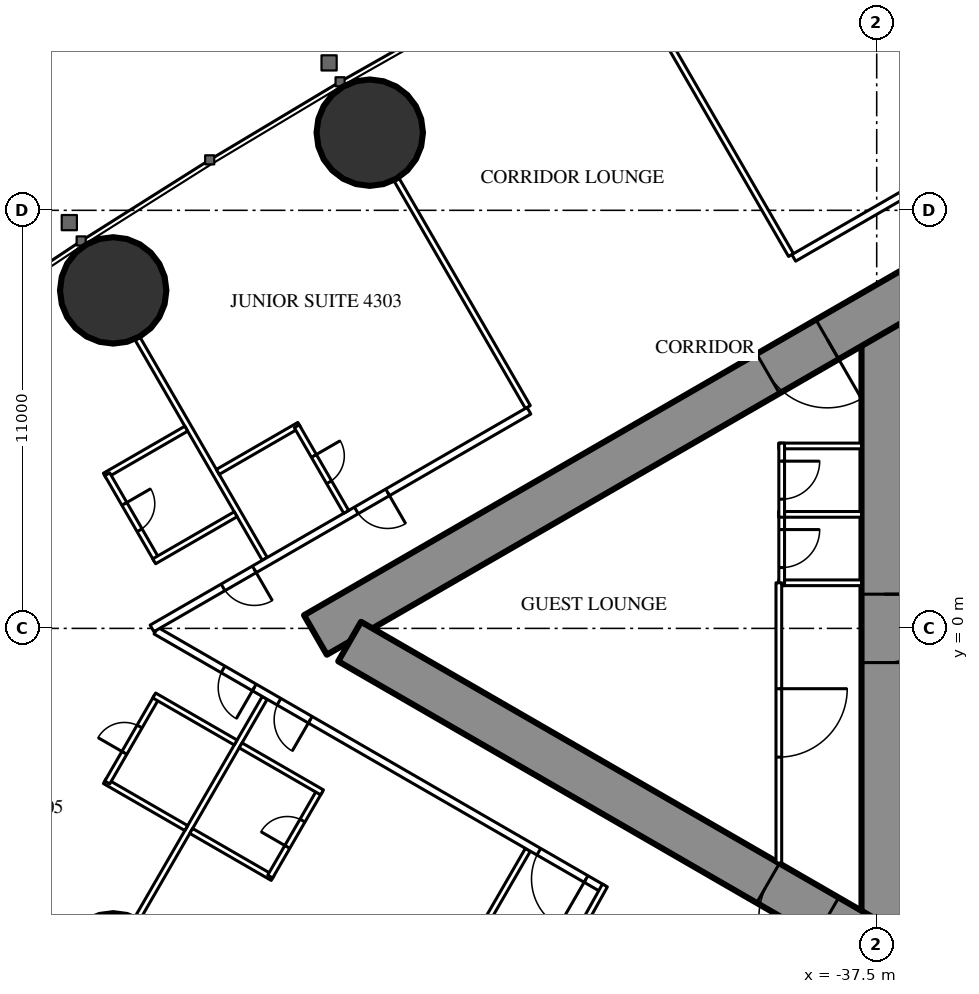
"""IFC4 building model, lengths in metres.
Left out: names, types, materials, properties, quantities, classifications, styles, units other than length and angle.
Written with IfcOpenShell. Run it as: python <this file> out.ifc"""

import sys

from ifc_helpers import new_model, si_unit, direction, frame, frame_2d, origin, origin_2d, place, context, subcontext, project, spatial, rectangle, circle, extrude, element, fill, save


model = new_model("IFC4")
c1 = context("Model", 3, precision=1e-05, world=origin(), true_north=direction((0.0, 1.0)))
c2 = subcontext(c1, "Body", "Model", "MODEL_VIEW")
j1 = project(units=[si_unit("LENGTHUNIT", "METRE"), si_unit("PLANEANGLEUNIT", "RADIAN")], contexts=[c1])
p1 = place(None, origin())
s1 = spatial("IfcSite", under=j1, at=p1, CompositionType="ELEMENT")
p2 = place(p1, origin())
s2 = spatial("IfcBuilding", under=s1, at=p2, CompositionType="ELEMENT")
p3 = place(p2, frame((0.0, 0.0, 163.3)))
s3 = spatial("IfcBuildingStorey", under=s2, at=p3, CompositionType="ELEMENT", Elevation=163.3)
for number, where, z_axis, x_axis in (
    (1, (-57.59, -8.893, 0.0), (0.0, 0.0, 1.0), (1.0, 0.0, 0.0)),
    (2, (-50.839, 13.043, 0.0), (0.0, 0.0, 1.0), (1.0, 0.0, 0.0)),
    (3, (-57.59, 8.893, 0.0), (0.0, 0.0, 1.0), (1.0, 0.0, 0.0)),
):
    element("IfcColumn", number, at=place(p3, frame(where, z_axis=z_axis, x_axis=x_axis)), inside=s3, PredefinedType="COLUMN", context=c2, shape_type="SweptSolid", body=[
        extrude(circle(Radius=1.4, at=origin_2d()), origin(), (0.0, 0.0, 1.0), 3.5),
    ])
p4 = place(p3, frame((-37.3, 8.6, 0.0), z_axis=(0.0, 0.0, 1.0), x_axis=(0.0, -1.0, 0.0)))
e4 = element("IfcWall", 4, at=p4, inside=s3, PredefinedType="SHEAR", context=c2, shape_type="SweptSolid", body=[
    extrude(rectangle(XDim=17.2, YDim=1.2, at=frame_2d((8.6, 0.0))), origin(), (0.0, 0.0, 1.0), 3.5),
])
p5 = place(p4, frame((7.7, 0.0, 0.0)))
e5 = element("IfcOpeningElement", 5, at=p5, cuts=e4, PredefinedType="OPENING", context=c2, shape_type="SweptSolid", body=[
    extrude(rectangle(XDim=1.8, YDim=2.2, at=frame_2d((0.9, 1.1))), frame((0.0, 0.61, 0.0), z_axis=(0.0, -1.0, 0.0), x_axis=(1.0, 0.0, 0.0)), (0.0, 0.0, 1.0), 1.22),
])
p6 = place(p3, frame((-27.2, 14.3, 0.0), z_axis=(0.0, 0.0, 1.0), x_axis=(-0.866026593062, -0.499997940104, 0.0)))
e6 = element("IfcWall", 6, at=p6, inside=s3, PredefinedType="SHEAR", context=c2, shape_type="SweptSolid", body=[
    extrude(rectangle(XDim=28.946, YDim=1.2, at=frame_2d((14.473, 0.0))), origin(), (0.0, 0.0, 1.0), 3.5),
])
p7 = place(p6, frame((4.6, 0.0, 0.0)))
e7 = element("IfcOpeningElement", 7, at=p7, cuts=e6, PredefinedType="OPENING", context=c2, shape_type="SweptSolid", body=[
    extrude(rectangle(XDim=1.0, YDim=2.2, at=frame_2d((0.5, 1.1))), frame((0.0, 0.61, 0.0), z_axis=(0.0, -1.0, 0.0), x_axis=(1.0, 0.0, 0.0)), (0.0, 0.0, 1.0), 1.22),
])
p8 = place(p6, frame((13.395, 0.0, 0.0)))
e8 = element("IfcOpeningElement", 8, at=p8, cuts=e6, PredefinedType="OPENING", context=c2, shape_type="SweptSolid", body=[
    extrude(rectangle(XDim=1.8, YDim=2.2, at=frame_2d((0.9, 1.1))), frame((0.0, 0.61, 0.0), z_axis=(0.0, -1.0, 0.0), x_axis=(1.0, 0.0, 0.0)), (0.0, 0.0, 1.0), 1.22),
])
p9 = place(p3, frame((-27.2, -14.3, 0.0), z_axis=(0.0, 0.0, 1.0), x_axis=(-0.866024021859, 0.500002393557, 0.0)))
e9 = element("IfcWall", 9, at=p9, inside=s3, PredefinedType="SHEAR", context=c2, shape_type="SweptSolid", body=[
    extrude(rectangle(XDim=27.907, YDim=1.2, at=frame_2d((13.954, 0.0))), origin(), (0.0, 0.0, 1.0), 3.5),
])
p10 = place(p9, frame((4.6, 0.0, 0.0)))
e10 = element("IfcOpeningElement", 10, at=p10, cuts=e9, PredefinedType="OPENING", context=c2, shape_type="SweptSolid", body=[
    extrude(rectangle(XDim=1.0, YDim=2.2, at=frame_2d((0.5, 1.1))), frame((0.0, 0.61, 0.0), z_axis=(0.0, -1.0, 0.0), x_axis=(1.0, 0.0, 0.0)), (0.0, 0.0, 1.0), 1.22),
])
p11 = place(p9, frame((13.395, 0.0, 0.0)))
e11 = element("IfcOpeningElement", 11, at=p11, cuts=e9, PredefinedType="OPENING", context=c2, shape_type="SweptSolid", body=[
    extrude(rectangle(XDim=1.8, YDim=2.2, at=frame_2d((0.9, 1.1))), frame((0.0, 0.61, 0.0), z_axis=(0.0, -1.0, 0.0), x_axis=(1.0, 0.0, 0.0)), (0.0, 0.0, 1.0), 1.22),
])
p12 = place(p3, frame((-39.754, 9.823, 0.0), z_axis=(0.0, 0.0, 1.0), x_axis=(-0.499997670926, 0.866026748472, 0.0)))
e12 = element("IfcWall", 12, at=p12, inside=s3, PredefinedType="PARTITIONING", context=c2, shape_type="SweptSolid", body=[
    extrude(rectangle(XDim=6.757, YDim=0.15, at=frame_2d((3.379, 0.0))), origin(), (0.0, 0.0, 1.0), 2.3),
])
p13 = place(p3, frame((-46.679, 5.825, 0.0), z_axis=(0.0, 0.0, 1.0), x_axis=(-0.500006839597, 0.866021454905, 0.0)))
e13 = element("IfcWall", 13, at=p13, inside=s3, PredefinedType="PARTITIONING", context=c2, shape_type="SweptSolid", body=[
    extrude(rectangle(XDim=6.911, YDim=0.15, at=frame_2d((3.456, 0.0))), origin(), (0.0, 0.0, 1.0), 2.3),
])
p14 = place(p3, frame((-53.602, 1.828, 0.0), z_axis=(0.0, 0.0, 1.0), x_axis=(-0.49999191814, 0.866030069798, 0.0)))
e14 = element("IfcWall", 14, at=p14, inside=s3, PredefinedType="PARTITIONING", context=c2, shape_type="SweptSolid", body=[
    extrude(rectangle(XDim=6.692, YDim=0.15, at=frame_2d((3.346, 0.0))), origin(), (0.0, 0.0, 1.0), 2.3),
])
p15 = place(p3, frame((-46.679, -5.825, 0.0), z_axis=(0.0, 0.0, 1.0), x_axis=(-0.500006839597, -0.866021454905, 0.0)))
e15 = element("IfcWall", 15, at=p15, inside=s3, PredefinedType="PARTITIONING", context=c2, shape_type="SweptSolid", body=[
    extrude(rectangle(XDim=6.911, YDim=0.15, at=frame_2d((3.456, 0.0))), origin(), (0.0, 0.0, 1.0), 2.3),
])
p16 = place(p3, frame((-53.602, -1.828, 0.0), z_axis=(0.0, 0.0, 1.0), x_axis=(-0.49999191814, -0.866030069798, 0.0)))
e16 = element("IfcWall", 16, at=p16, inside=s3, PredefinedType="PARTITIONING", context=c2, shape_type="SweptSolid", body=[
    extrude(rectangle(XDim=6.692, YDim=0.15, at=frame_2d((3.346, 0.0))), origin(), (0.0, 0.0, 1.0), 2.3),
])
p17 = place(p3, frame((-44.715, -6.844, 0.0), z_axis=(0.0, 0.0, 1.0), x_axis=(-0.866025261224, 0.500000246922, 0.0)))
e17 = element("IfcWall", 17, at=p17, inside=s3, PredefinedType="PARTITIONING", context=c2, shape_type="SweptSolid", body=[
    extrude(rectangle(XDim=13.567, YDim=0.2, at=frame_2d((6.783, 0.0))), origin(), (0.0, 0.0, 1.0), 3.25),
])
p18 = place(p17, frame((10.579, 0.0, 0.0)))
e18 = element("IfcOpeningElement", 18, at=p18, cuts=e17, PredefinedType="OPENING", context=c2, shape_type="SweptSolid", body=[
    extrude(rectangle(XDim=0.95, YDim=2.2, at=frame_2d((0.475, 1.1))), frame((0.0, 0.11, 0.0), z_axis=(0.0, -1.0, 0.0), x_axis=(1.0, 0.0, 0.0)), (0.0, 0.0, 1.0), 0.22),
])
p19 = place(p17, frame((8.879, 0.0, 0.0)))
e19 = element("IfcOpeningElement", 19, at=p19, cuts=e17, PredefinedType="OPENING", context=c2, shape_type="SweptSolid", body=[
    extrude(rectangle(XDim=0.95, YDim=2.2, at=frame_2d((0.475, 1.1))), frame((0.0, 0.11, 0.0), z_axis=(0.0, -1.0, 0.0), x_axis=(1.0, 0.0, 0.0)), (0.0, 0.0, 1.0), 0.22),
])
p20 = place(p17, frame((0.5, 0.0, 0.0)))
e20 = element("IfcOpeningElement", 20, at=p20, cuts=e17, PredefinedType="OPENING", context=c2, shape_type="SweptSolid", body=[
    extrude(rectangle(XDim=1.435, YDim=2.2, at=frame_2d((0.718, 1.1))), frame((0.0, 0.11, 0.0), z_axis=(0.0, -1.0, 0.0), x_axis=(1.0, 0.0, 0.0)), (0.0, 0.0, 1.0), 0.22),
])
p21 = place(p3, frame((-44.652, -6.764, 0.0), z_axis=(0.0, 0.0, 1.0), x_axis=(-0.485424724123, -0.874278466629, 0.0)))
e21 = element("IfcWall", 21, at=p21, inside=s3, PredefinedType="PARTITIONING", context=c2, shape_type="SweptSolid", body=[
    extrude(rectangle(XDim=1.805, YDim=0.15, at=frame_2d((0.903, 0.0))), origin(), (0.0, 0.0, 1.0), 3.25),
])
p22 = place(p3, frame((-27.86, 16.575, 0.0), z_axis=(0.0, 0.0, 1.0), x_axis=(-0.866026850238, -0.499997494661, 0.0)))
e22 = element("IfcWall", 22, at=p22, inside=s3, PredefinedType="PARTITIONING", context=c2, shape_type="SweptSolid", body=[
    extrude(rectangle(XDim=13.651, YDim=0.2, at=frame_2d((6.826, 0.0))), origin(), (0.0, 0.0, 1.0), 3.25),
])
p23 = place(p22, frame((3.75, 0.0, 0.0)))
e23 = element("IfcOpeningElement", 23, at=p23, cuts=e22, PredefinedType="OPENING", context=c2, shape_type="SweptSolid", body=[
    extrude(rectangle(XDim=1.0, YDim=2.2, at=frame_2d((0.5, 1.1))), frame((0.0, 0.11, 0.0), z_axis=(0.0, -1.0, 0.0), x_axis=(1.0, 0.0, 0.0)), (0.0, 0.0, 1.0), 0.22),
])
p24 = place(p3, frame((-46.65, 5.726, 0.0), z_axis=(0.0, 0.0, 1.0), x_axis=(-0.866027963864, -0.499995565786, 0.0)))
e24 = element("IfcWall", 24, at=p24, inside=s3, PredefinedType="PARTITIONING", context=c2, shape_type="SweptSolid", body=[
    extrude(rectangle(XDim=11.452, YDim=0.2, at=frame_2d((5.726, 0.0))), origin(), (0.0, 0.0, 1.0), 3.25),
])
p25 = place(p24, frame((4.294, 0.0, 0.0)))
e25 = element("IfcOpeningElement", 25, at=p25, cuts=e24, PredefinedType="OPENING", context=c2, shape_type="SweptSolid", body=[
    extrude(rectangle(XDim=0.95, YDim=2.2, at=frame_2d((0.475, 1.1))), frame((0.0, 0.11, 0.0), z_axis=(0.0, -1.0, 0.0), x_axis=(1.0, 0.0, 0.0)), (0.0, 0.0, 1.0), 0.22),
])
p26 = place(p24, frame((8.344, 0.0, 0.0)))
e26 = element("IfcOpeningElement", 26, at=p26, cuts=e24, PredefinedType="OPENING", context=c2, shape_type="SweptSolid", body=[
    extrude(rectangle(XDim=0.95, YDim=2.2, at=frame_2d((0.475, 1.1))), frame((0.0, 0.11, 0.0), z_axis=(0.0, -1.0, 0.0), x_axis=(1.0, 0.0, 0.0)), (0.0, 0.0, 1.0), 0.22),
])
p27 = place(p3, frame((-52.694, 5.355, 0.0), z_axis=(0.0, 0.0, 1.0), x_axis=(-0.866031185235, -0.4999899861, 0.0)))
e27 = element("IfcWall", 27, at=p27, inside=s3, PredefinedType="PARTITIONING", context=c2, shape_type="SweptSolid", body=[
    extrude(rectangle(XDim=2.475, YDim=0.15, at=frame_2d((1.238, 0.0))), origin(), (0.0, 0.0, 1.0), 3.25),
])
p28 = place(p3, frame((-51.459, 3.065, 0.0), z_axis=(0.0, 0.0, 1.0), x_axis=(-0.499936506574, 0.866062058628, 0.0)))
e28 = element("IfcWall", 28, at=p28, inside=s3, PredefinedType="PARTITIONING", context=c2, shape_type="SweptSolid", body=[
    extrude(rectangle(XDim=2.6, YDim=0.15, at=frame_2d((1.3, 0.0))), origin(), (0.0, 0.0, 1.0), 3.25),
])
p29 = place(p28, frame((0.9, 0.0, 0.0)))
e29 = element("IfcOpeningElement", 29, at=p29, cuts=e28, PredefinedType="OPENING", context=c2, shape_type="SweptSolid", body=[
    extrude(rectangle(XDim=0.8, YDim=2.2, at=frame_2d((0.4, 1.1))), frame((0.0, 0.085, 0.0), z_axis=(0.0, -1.0, 0.0), x_axis=(1.0, 0.0, 0.0)), (0.0, 0.0, 1.0), 0.17),
])
p30 = place(p3, frame((-55.667, 5.255, 0.0), z_axis=(0.0, 0.0, 1.0), x_axis=(-0.866006523861, -0.500032699561, 0.0)))
e30 = element("IfcWall", 30, at=p30, inside=s3, PredefinedType="PARTITIONING", context=c2, shape_type="SweptSolid", body=[
    extrude(rectangle(XDim=2.475, YDim=0.15, at=frame_2d((1.237, 0.0))), origin(), (0.0, 0.0, 1.0), 3.25),
])
p31 = place(p3, frame((-56.446, 1.803, 0.0), z_axis=(0.0, 0.0, 1.0), x_axis=(-0.499936506574, 0.866062058628, 0.0)))
e31 = element("IfcWall", 31, at=p31, inside=s3, PredefinedType="PARTITIONING", context=c2, shape_type="SweptSolid", body=[
    extrude(rectangle(XDim=2.6, YDim=0.15, at=frame_2d((1.3, 0.0))), origin(), (0.0, 0.0, 1.0), 3.25),
])
p32 = place(p31, frame((0.9, 0.0, 0.0)))
e32 = element("IfcOpeningElement", 32, at=p32, cuts=e31, PredefinedType="OPENING", context=c2, shape_type="SweptSolid", body=[
    extrude(rectangle(XDim=0.8, YDim=2.2, at=frame_2d((0.4, 1.1))), frame((0.0, 0.085, 0.0), z_axis=(0.0, -1.0, 0.0), x_axis=(1.0, 0.0, 0.0)), (0.0, 0.0, 1.0), 0.17),
])
p33 = place(p3, frame((-54.367, 3.003, 0.0), z_axis=(0.0, 0.0, 1.0), x_axis=(-0.866031185235, -0.4999899861, 0.0)))
e33 = element("IfcWall", 33, at=p33, inside=s3, PredefinedType="PARTITIONING", context=c2, shape_type="SweptSolid", body=[
    extrude(rectangle(XDim=2.475, YDim=0.15, at=frame_2d((1.238, 0.0))), origin(), (0.0, 0.0, 1.0), 3.25),
])
p34 = place(p3, frame((-55.667, -5.255, 0.0), z_axis=(0.0, 0.0, 1.0), x_axis=(-0.866006523861, 0.500032699561, 0.0)))
e34 = element("IfcWall", 34, at=p34, inside=s3, PredefinedType="PARTITIONING", context=c2, shape_type="SweptSolid", body=[
    extrude(rectangle(XDim=2.475, YDim=0.15, at=frame_2d((1.237, 0.0))), origin(), (0.0, 0.0, 1.0), 3.25),
])
p35 = place(p3, frame((-56.446, -1.803, 0.0), z_axis=(0.0, 0.0, 1.0), x_axis=(-0.499936506574, -0.866062058628, 0.0)))
e35 = element("IfcWall", 35, at=p35, inside=s3, PredefinedType="PARTITIONING", context=c2, shape_type="SweptSolid", body=[
    extrude(rectangle(XDim=2.6, YDim=0.15, at=frame_2d((1.3, 0.0))), origin(), (0.0, 0.0, 1.0), 3.25),
])
p36 = place(p35, frame((0.9, 0.0, 0.0)))
e36 = element("IfcOpeningElement", 36, at=p36, cuts=e35, PredefinedType="OPENING", context=c2, shape_type="SweptSolid", body=[
    extrude(rectangle(XDim=0.8, YDim=2.2, at=frame_2d((0.4, 1.1))), frame((0.0, 0.085, 0.0), z_axis=(0.0, -1.0, 0.0), x_axis=(1.0, 0.0, 0.0)), (0.0, 0.0, 1.0), 0.17),
])
for number, where, z_axis, x_axis in (
    (37, (-54.367, -3.003, 0.0), (0.0, 0.0, 1.0), (-0.866, 0.5, 0.0)),
    (38, (-53.394, -6.567, 0.0), (0.0, 0.0, 1.0), (-0.866, 0.5, 0.0)),
):
    element("IfcWall", number, at=place(p3, frame(where, z_axis=z_axis, x_axis=x_axis)), inside=s3, PredefinedType="PARTITIONING", context=c2, shape_type="SweptSolid", body=[
        extrude(rectangle(XDim=2.475, YDim=0.15, at=frame_2d((1.238, 0.0))), origin(), (0.0, 0.0, 1.0), 3.25),
    ])
p37 = place(p3, frame((-52.159, -4.278, 0.0), z_axis=(0.0, 0.0, 1.0), x_axis=(-0.500047596559, -0.865997922154, 0.0)))
e39 = element("IfcWall", 39, at=p37, inside=s3, PredefinedType="PARTITIONING", context=c2, shape_type="SweptSolid", body=[
    extrude(rectangle(XDim=2.6, YDim=0.15, at=frame_2d((1.3, 0.0))), origin(), (0.0, 0.0, 1.0), 3.25),
])
p38 = place(p37, frame((0.9, 0.0, 0.0)))
e40 = element("IfcOpeningElement", 40, at=p38, cuts=e39, PredefinedType="OPENING", context=c2, shape_type="SweptSolid", body=[
    extrude(rectangle(XDim=0.8, YDim=2.2, at=frame_2d((0.4, 1.1))), frame((0.0, 0.085, 0.0), z_axis=(0.0, -1.0, 0.0), x_axis=(1.0, 0.0, 0.0)), (0.0, 0.0, 1.0), 0.17),
])
p39 = place(p3, frame((-52.094, -4.315, 0.0), z_axis=(0.0, 0.0, 1.0), x_axis=(-0.866006523861, 0.500032699561, 0.0)))
e41 = element("IfcWall", 41, at=p39, inside=s3, PredefinedType="PARTITIONING", context=c2, shape_type="SweptSolid", body=[
    extrude(rectangle(XDim=2.475, YDim=0.15, at=frame_2d((1.237, 0.0))), origin(), (0.0, 0.0, 1.0), 2.45),
])
for number, where, z_axis, x_axis in (
    (42, (-37.9, 1.2, 0.0), (0.0, 0.0, 1.0), (-1.0, 0.0, 0.0)),
    (43, (-37.9, 3.0, 0.0), (0.0, 0.0, 1.0), (-1.0, 0.0, 0.0)),
    (44, (-37.9, 4.8, 0.0), (0.0, 0.0, 1.0), (-1.0, 0.0, 0.0)),
):
    element("IfcWall", number, at=place(p3, frame(where, z_axis=z_axis, x_axis=x_axis)), inside=s3, PredefinedType="PARTITIONING", context=c2, shape_type="SweptSolid", body=[
        extrude(rectangle(XDim=2.175, YDim=0.15, at=frame_2d((1.087, 0.0))), origin(), (0.0, 0.0, 1.0), 3.25),
    ])
p40 = place(p3, frame((-40.0, 3.075, 0.0), z_axis=(0.0, 0.0, 1.0), x_axis=(0.0, -1.0, 0.0)))
e45 = element("IfcWall", 45, at=p40, inside=s3, PredefinedType="PARTITIONING", context=c2, shape_type="SweptSolid", body=[
    extrude(rectangle(XDim=1.95, YDim=0.15, at=frame_2d((0.975, 0.0))), origin(), (0.0, 0.0, 1.0), 3.25),
])
p41 = place(p40, frame((0.475, 0.0, 0.0)))
e46 = element("IfcOpeningElement", 46, at=p41, cuts=e45, PredefinedType="OPENING", context=c2, shape_type="SweptSolid", body=[
    extrude(rectangle(XDim=1.0, YDim=2.2, at=frame_2d((0.5, 1.1))), frame((0.0, 0.085, 0.0), z_axis=(0.0, -1.0, 0.0), x_axis=(1.0, 0.0, 0.0)), (0.0, 0.0, 1.0), 0.17),
])
p42 = place(p3, frame((-40.0, 4.875, 0.0), z_axis=(0.0, 0.0, 1.0), x_axis=(0.0, -1.0, 0.0)))
e47 = element("IfcWall", 47, at=p42, inside=s3, PredefinedType="PARTITIONING", context=c2, shape_type="SweptSolid", body=[
    extrude(rectangle(XDim=1.95, YDim=0.15, at=frame_2d((0.975, 0.0))), origin(), (0.0, 0.0, 1.0), 3.25),
])
p43 = place(p42, frame((0.475, 0.0, 0.0)))
e48 = element("IfcOpeningElement", 48, at=p43, cuts=e47, PredefinedType="OPENING", context=c2, shape_type="SweptSolid", body=[
    extrude(rectangle(XDim=1.0, YDim=2.2, at=frame_2d((0.5, 1.1))), frame((0.0, 0.085, 0.0), z_axis=(0.0, -1.0, 0.0), x_axis=(1.0, 0.0, 0.0)), (0.0, 0.0, 1.0), 0.17),
])
p44 = place(p3, frame((-40.075, 1.2, 0.0), z_axis=(0.0, 0.0, 1.0), x_axis=(0.0, -1.0, 0.0)))
e49 = element("IfcWall", 49, at=p44, inside=s3, PredefinedType="PARTITIONING", context=c2, shape_type="SweptSolid", body=[
    extrude(rectangle(XDim=7.374, YDim=0.15, at=frame_2d((3.687, 0.0))), origin(), (0.0, 0.0, 1.0), 3.25),
])
p45 = place(p44, frame((2.787, 0.0, 0.0)))
e50 = element("IfcOpeningElement", 50, at=p45, cuts=e49, PredefinedType="OPENING", context=c2, shape_type="SweptSolid", body=[
    extrude(rectangle(XDim=1.8, YDim=2.2, at=frame_2d((0.9, 1.1))), frame((0.0, 0.085, 0.0), z_axis=(0.0, -1.0, 0.0), x_axis=(1.0, 0.0, 0.0)), (0.0, 0.0, 1.0), 0.17),
])
p46 = place(p29, origin())
e51 = element("IfcDoor", 51, at=p46, inside=s3, OperationType="SINGLE_SWING_RIGHT", PredefinedType="DOOR", context=c2, shape_type="SweptSolid", body=[
    extrude(rectangle(XDim=0.8, YDim=2.2, at=frame_2d((0.4, 1.1))), frame((0.0, 0.025, 0.0), z_axis=(0.0, -1.0, 0.0), x_axis=(1.0, 0.0, 0.0)), (0.0, 0.0, 1.0), 0.05),
])
fill(e29, e51)
p47 = place(p25, origin())
e52 = element("IfcDoor", 52, at=p47, inside=s3, OperationType="SINGLE_SWING_LEFT", PredefinedType="DOOR", context=c2, shape_type="SweptSolid", body=[
    extrude(rectangle(XDim=0.95, YDim=2.2, at=frame_2d((0.475, 1.1))), frame((0.0, 0.025, 0.0), z_axis=(0.0, -1.0, 0.0), x_axis=(1.0, 0.0, 0.0)), (0.0, 0.0, 1.0), 0.05),
])
fill(e25, e52)
p48 = place(p32, origin())
e53 = element("IfcDoor", 53, at=p48, inside=s3, OperationType="SINGLE_SWING_RIGHT", PredefinedType="DOOR", context=c2, shape_type="SweptSolid", body=[
    extrude(rectangle(XDim=0.8, YDim=2.2, at=frame_2d((0.4, 1.1))), frame((0.0, 0.025, 0.0), z_axis=(0.0, -1.0, 0.0), x_axis=(1.0, 0.0, 0.0)), (0.0, 0.0, 1.0), 0.05),
])
fill(e32, e53)
p49 = place(p26, origin())
e54 = element("IfcDoor", 54, at=p49, inside=s3, OperationType="SINGLE_SWING_LEFT", PredefinedType="DOOR", context=c2, shape_type="SweptSolid", body=[
    extrude(rectangle(XDim=0.95, YDim=2.2, at=frame_2d((0.475, 1.1))), frame((0.0, 0.025, 0.0), z_axis=(0.0, -1.0, 0.0), x_axis=(1.0, 0.0, 0.0)), (0.0, 0.0, 1.0), 0.05),
])
fill(e26, e54)
p50 = place(p36, origin())
e55 = element("IfcDoor", 55, at=p50, inside=s3, OperationType="SINGLE_SWING_RIGHT", PredefinedType="DOOR", context=c2, shape_type="SweptSolid", body=[
    extrude(rectangle(XDim=0.8, YDim=2.2, at=frame_2d((0.4, 1.1))), frame((0.0, 0.025, 0.0), z_axis=(0.0, -1.0, 0.0), x_axis=(1.0, 0.0, 0.0)), (0.0, 0.0, 1.0), 0.05),
])
fill(e36, e55)
p51 = place(p18, origin())
e56 = element("IfcDoor", 56, at=p51, inside=s3, OperationType="SINGLE_SWING_LEFT", PredefinedType="DOOR", context=c2, shape_type="SweptSolid", body=[
    extrude(rectangle(XDim=0.95, YDim=2.2, at=frame_2d((0.475, 1.1))), frame((0.0, 0.025, 0.0), z_axis=(0.0, -1.0, 0.0), x_axis=(1.0, 0.0, 0.0)), (0.0, 0.0, 1.0), 0.05),
])
fill(e18, e56)
p52 = place(p38, origin())
e57 = element("IfcDoor", 57, at=p52, inside=s3, OperationType="SINGLE_SWING_RIGHT", PredefinedType="DOOR", context=c2, shape_type="SweptSolid", body=[
    extrude(rectangle(XDim=0.8, YDim=2.2, at=frame_2d((0.4, 1.1))), frame((0.0, 0.025, 0.0), z_axis=(0.0, -1.0, 0.0), x_axis=(1.0, 0.0, 0.0)), (0.0, 0.0, 1.0), 0.05),
])
fill(e40, e57)
p53 = place(p19, origin())
e58 = element("IfcDoor", 58, at=p53, inside=s3, OperationType="SINGLE_SWING_LEFT", PredefinedType="DOOR", context=c2, shape_type="SweptSolid", body=[
    extrude(rectangle(XDim=0.95, YDim=2.2, at=frame_2d((0.475, 1.1))), frame((0.0, 0.025, 0.0), z_axis=(0.0, -1.0, 0.0), x_axis=(1.0, 0.0, 0.0)), (0.0, 0.0, 1.0), 0.05),
])
fill(e19, e58)
p54 = place(p20, origin())
e59 = element("IfcDoor", 59, at=p54, inside=s3, OperationType="SINGLE_SWING_LEFT", PredefinedType="DOOR", context=c2, shape_type="SweptSolid", body=[
    extrude(rectangle(XDim=1.435, YDim=2.2, at=frame_2d((0.718, 1.1))), frame((0.0, 0.025, 0.0), z_axis=(0.0, -1.0, 0.0), x_axis=(1.0, 0.0, 0.0)), (0.0, 0.0, 1.0), 0.05),
])
fill(e20, e59)
p55 = place(p41, origin())
e60 = element("IfcDoor", 60, at=p55, inside=s3, OperationType="SINGLE_SWING_LEFT", PredefinedType="DOOR", context=c2, shape_type="SweptSolid", body=[
    extrude(rectangle(XDim=1.0, YDim=2.2, at=frame_2d((0.5, 1.1))), frame((0.0, 0.025, 0.0), z_axis=(0.0, -1.0, 0.0), x_axis=(1.0, 0.0, 0.0)), (0.0, 0.0, 1.0), 0.05),
])
fill(e46, e60)
p56 = place(p43, origin())
e61 = element("IfcDoor", 61, at=p56, inside=s3, OperationType="SINGLE_SWING_LEFT", PredefinedType="DOOR", context=c2, shape_type="SweptSolid", body=[
    extrude(rectangle(XDim=1.0, YDim=2.2, at=frame_2d((0.5, 1.1))), frame((0.0, 0.025, 0.0), z_axis=(0.0, -1.0, 0.0), x_axis=(1.0, 0.0, 0.0)), (0.0, 0.0, 1.0), 0.05),
])
fill(e48, e61)
p57 = place(p45, origin())
e62 = element("IfcDoor", 62, at=p57, inside=s3, OperationType="DOUBLE_DOOR_SINGLE_SWING", PredefinedType="DOOR", context=c2, shape_type="SweptSolid", body=[
    extrude(rectangle(XDim=1.8, YDim=2.2, at=frame_2d((0.9, 1.1))), frame((0.0, 0.025, 0.0), z_axis=(0.0, -1.0, 0.0), x_axis=(1.0, 0.0, 0.0)), (0.0, 0.0, 1.0), 0.05),
])
fill(e50, e62)
p58 = place(p8, origin())
e63 = element("IfcDoor", 63, at=p58, inside=s3, OperationType="DOUBLE_DOOR_SINGLE_SWING", PredefinedType="DOOR", context=c2, shape_type="SweptSolid", body=[
    extrude(rectangle(XDim=1.8, YDim=2.2, at=frame_2d((0.9, 1.1))), frame((0.0, 0.025, 0.0), z_axis=(0.0, -1.0, 0.0), x_axis=(1.0, 0.0, 0.0)), (0.0, 0.0, 1.0), 0.05),
])
fill(e8, e63)
p59 = place(p11, origin())
e64 = element("IfcDoor", 64, at=p59, inside=s3, OperationType="DOUBLE_DOOR_SINGLE_SWING", PredefinedType="DOOR", context=c2, shape_type="SweptSolid", body=[
    extrude(rectangle(XDim=1.8, YDim=2.2, at=frame_2d((0.9, 1.1))), frame((0.0, 0.025, 0.0), z_axis=(0.0, -1.0, 0.0), x_axis=(1.0, 0.0, 0.0)), (0.0, 0.0, 1.0), 0.05),
])
fill(e11, e64)
p60 = place(p5, origin())
e65 = element("IfcDoor", 65, at=p60, inside=s3, OperationType="DOUBLE_DOOR_SINGLE_SWING", PredefinedType="DOOR", context=c2, shape_type="SweptSolid", body=[
    extrude(rectangle(XDim=1.8, YDim=2.2, at=frame_2d((0.9, 1.1))), frame((0.0, 0.025, 0.0), z_axis=(0.0, -1.0, 0.0), x_axis=(1.0, 0.0, 0.0)), (0.0, 0.0, 1.0), 0.05),
])
fill(e5, e65)
save(model, sys.argv[1])
